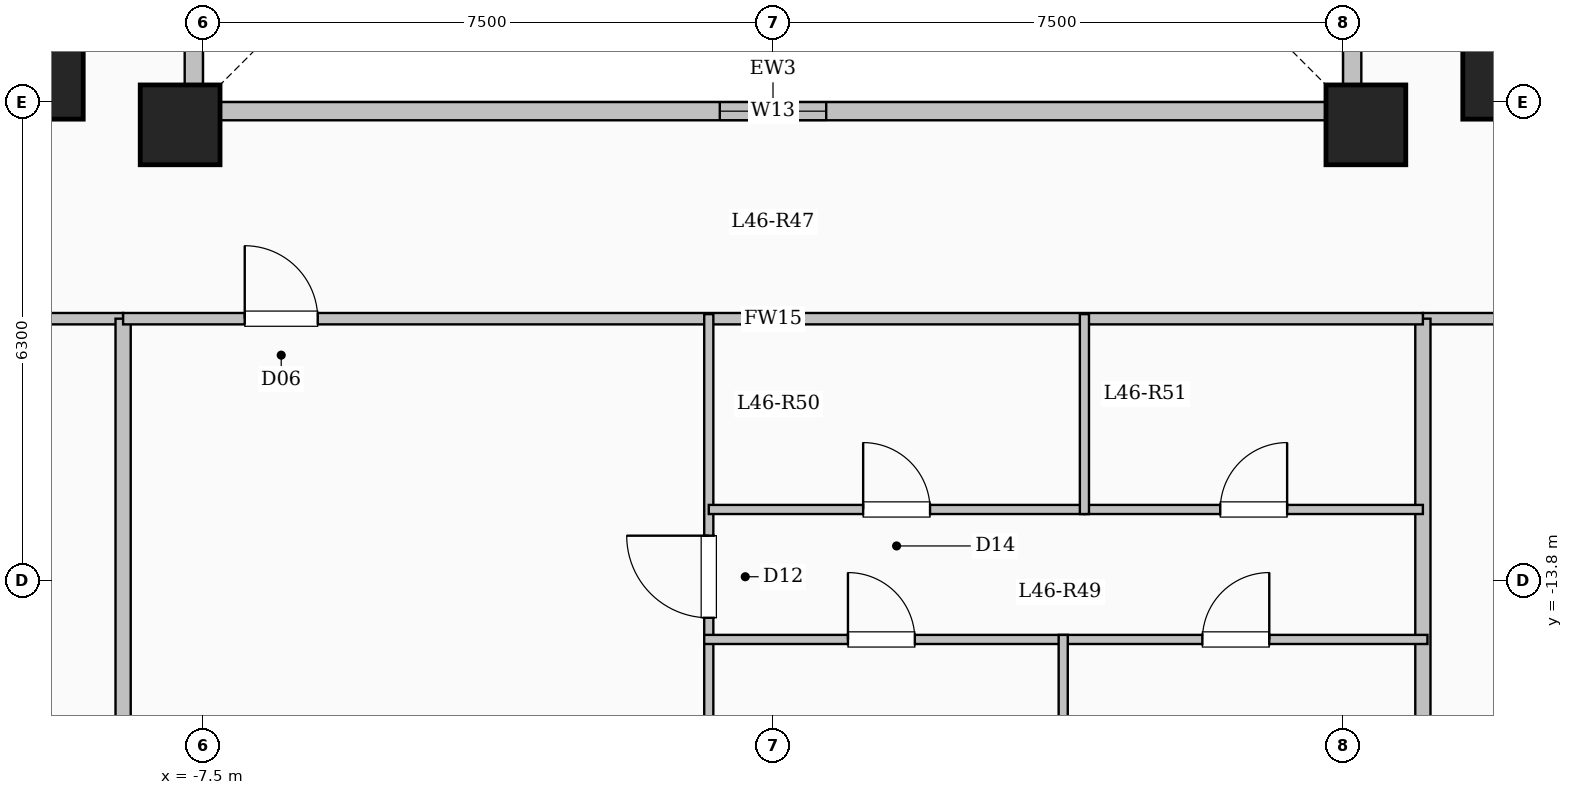
"""IFC4 building model, lengths in metres.
Left out: names, types, materials, properties, quantities, classifications, styles, units other than length and angle.
Written with IfcOpenShell. Run it as: python <this file> out.ifc"""

import sys

from ifc_helpers import new_model, si_unit, direction, frame, frame_2d, origin, origin_2d, place, context, subcontext, project, spatial, rectangle, extrude, element, fill, save


model = new_model("IFC4")
c1 = context("Model", 3, precision=1e-05, world=origin(), true_north=direction((0.0, 1.0)))
c2 = subcontext(c1, "Body", "Model", "MODEL_VIEW")
j1 = project(units=[si_unit("LENGTHUNIT", "METRE"), si_unit("PLANEANGLEUNIT", "RADIAN")], contexts=[c1])
p1 = place(None, origin())
s1 = spatial("IfcSite", under=j1, at=p1, CompositionType="ELEMENT")
p2 = place(p1, origin())
s2 = spatial("IfcBuilding", under=s1, at=p2, CompositionType="ELEMENT")
p3 = place(p2, frame((0.0, 0.0, 169.45)))
s3 = spatial("IfcBuildingStorey", under=s2, at=p3, CompositionType="ELEMENT", Elevation=169.45)
for number, where, z_axis, x_axis in (
    (1, (-7.8, -7.8, 0.0), (0.0, 0.0, 1.0), (1.0, 0.0, 0.0)),
    (2, (7.8, -7.8, 0.0), (0.0, 0.0, 1.0), (1.0, 0.0, 0.0)),
    (3, (-9.6, -7.2, 0.0), (0.0, 0.0, 1.0), (1.0, 0.0, 0.0)),
    (4, (9.6, -7.2, 0.0), (0.0, 0.0, 1.0), (1.0, 0.0, 0.0)),
):
    element("IfcColumn", number, at=place(p3, frame(where, z_axis=z_axis, x_axis=x_axis)), inside=s3, PredefinedType="COLUMN", context=c2, shape_type="SweptSolid", body=[
        extrude(rectangle(XDim=1.05, YDim=1.05, at=origin_2d()), origin(), (0.0, 0.0, 1.0), 3.35),
    ])
p4 = place(p3, frame((-7.62, -7.62, 0.0), z_axis=(0.0, 0.0, 1.0), x_axis=(1.0, 0.0, 0.0)))
e5 = element("IfcWall", 5, at=p4, inside=s3, PredefinedType="SOLIDWALL", context=c2, shape_type="SweptSolid", body=[
    extrude(rectangle(XDim=15.24, YDim=0.24, at=frame_2d((7.62, 0.0))), origin(), (0.0, 0.0, 1.0), 3.05),
])
p5 = place(p4, frame((6.92, 0.0, 0.95)))
e6 = element("IfcOpeningElement", 6, at=p5, cuts=e5, PredefinedType="OPENING", context=c2, shape_type="SweptSolid", body=[
    extrude(rectangle(XDim=1.4, YDim=1.5, at=frame_2d((0.7, 0.75))), frame((0.0, 0.13, 0.0), z_axis=(0.0, -1.0, 0.0), x_axis=(1.0, 0.0, 0.0)), (0.0, 0.0, 1.0), 0.26),
])
p6 = place(p3, frame((7.62, -7.62, 0.0), z_axis=(0.0, 0.0, 1.0), x_axis=(0.0, 1.0, 0.0)))
e7 = element("IfcWall", 7, at=p6, inside=s3, PredefinedType="SOLIDWALL", context=c2, shape_type="SweptSolid", body=[
    extrude(rectangle(XDim=15.24, YDim=0.24, at=frame_2d((7.62, 0.0))), origin(), (0.0, 0.0, 1.0), 3.05),
])
p7 = place(p6, frame((6.92, 0.0, 0.95)))
e8 = element("IfcOpeningElement", 8, at=p7, cuts=e7, PredefinedType="OPENING", context=c2, shape_type="SweptSolid", body=[
    extrude(rectangle(XDim=1.4, YDim=1.5, at=frame_2d((0.7, 0.75))), frame((0.0, 0.13, 0.0), z_axis=(0.0, -1.0, 0.0), x_axis=(1.0, 0.0, 0.0)), (0.0, 0.0, 1.0), 0.26),
])
p8 = place(p3, frame((-7.62, 7.62, 0.0), z_axis=(0.0, 0.0, 1.0), x_axis=(0.0, -1.0, 0.0)))
e9 = element("IfcWall", 9, at=p8, inside=s3, PredefinedType="SOLIDWALL", context=c2, shape_type="SweptSolid", body=[
    extrude(rectangle(XDim=15.24, YDim=0.24, at=frame_2d((7.62, 0.0))), origin(), (0.0, 0.0, 1.0), 3.05),
])
p9 = place(p8, frame((6.92, 0.0, 0.95)))
e10 = element("IfcOpeningElement", 10, at=p9, cuts=e9, PredefinedType="OPENING", context=c2, shape_type="SweptSolid", body=[
    extrude(rectangle(XDim=1.4, YDim=1.5, at=frame_2d((0.7, 0.75))), frame((0.0, 0.13, 0.0), z_axis=(0.0, -1.0, 0.0), x_axis=(1.0, 0.0, 0.0)), (0.0, 0.0, 1.0), 0.26),
])
p10 = place(p3, frame((-19.55, -10.35, 0.0), z_axis=(0.0, 0.0, 1.0), x_axis=(1.0, 0.0, 0.0)))
e11 = element("IfcWall", 11, at=p10, inside=s3, PredefinedType="PARTITIONING", context=c2, shape_type="SweptSolid", body=[
    extrude(rectangle(XDim=11.0, YDim=0.15, at=frame_2d((5.5, 0.0))), origin(), (0.0, 0.0, 1.0), 3.05),
])
p11 = place(p10, frame((1.466, 0.0, 0.0)))
e12 = element("IfcOpeningElement", 12, at=p11, cuts=e11, PredefinedType="OPENING", context=c2, shape_type="SweptSolid", body=[
    extrude(rectangle(XDim=0.95, YDim=2.15, at=frame_2d((0.475, 1.075))), frame((0.0, 0.085, 0.0), z_axis=(0.0, -1.0, 0.0), x_axis=(1.0, 0.0, 0.0)), (0.0, 0.0, 1.0), 0.17),
])
p12 = place(p10, frame((5.438, 0.0, 0.0)))
e13 = element("IfcOpeningElement", 13, at=p12, cuts=e11, PredefinedType="OPENING", context=c2, shape_type="SweptSolid", body=[
    extrude(rectangle(XDim=0.95, YDim=2.15, at=frame_2d((0.475, 1.075))), frame((0.0, 0.085, 0.0), z_axis=(0.0, -1.0, 0.0), x_axis=(1.0, 0.0, 0.0)), (0.0, 0.0, 1.0), 0.17),
])
p13 = place(p10, frame((8.972, 0.0, 0.0)))
e14 = element("IfcOpeningElement", 14, at=p13, cuts=e11, PredefinedType="OPENING", context=c2, shape_type="SweptSolid", body=[
    extrude(rectangle(XDim=0.95, YDim=2.15, at=frame_2d((0.475, 1.075))), frame((0.0, 0.085, 0.0), z_axis=(0.0, -1.0, 0.0), x_axis=(1.0, 0.0, 0.0)), (0.0, 0.0, 1.0), 0.17),
])
p14 = place(p3, frame((8.55, -10.35, 0.0), z_axis=(0.0, 0.0, 1.0), x_axis=(1.0, 0.0, 0.0)))
e15 = element("IfcWall", 15, at=p14, inside=s3, PredefinedType="PARTITIONING", context=c2, shape_type="SweptSolid", body=[
    extrude(rectangle(XDim=11.0, YDim=0.15, at=frame_2d((5.5, 0.0))), origin(), (0.0, 0.0, 1.0), 3.05),
])
p15 = place(p14, frame((1.516, 0.0, 0.0)))
e16 = element("IfcOpeningElement", 16, at=p15, cuts=e15, PredefinedType="OPENING", context=c2, shape_type="SweptSolid", body=[
    extrude(rectangle(XDim=0.95, YDim=2.15, at=frame_2d((0.475, 1.075))), frame((0.0, 0.085, 0.0), z_axis=(0.0, -1.0, 0.0), x_axis=(1.0, 0.0, 0.0)), (0.0, 0.0, 1.0), 0.17),
])
p16 = place(p14, frame((5.488, 0.0, 0.0)))
e17 = element("IfcOpeningElement", 17, at=p16, cuts=e15, PredefinedType="OPENING", context=c2, shape_type="SweptSolid", body=[
    extrude(rectangle(XDim=0.95, YDim=2.15, at=frame_2d((0.475, 1.075))), frame((0.0, 0.085, 0.0), z_axis=(0.0, -1.0, 0.0), x_axis=(1.0, 0.0, 0.0)), (0.0, 0.0, 1.0), 0.17),
])
p17 = place(p14, frame((9.022, 0.0, 0.0)))
e18 = element("IfcOpeningElement", 18, at=p17, cuts=e15, PredefinedType="OPENING", context=c2, shape_type="SweptSolid", body=[
    extrude(rectangle(XDim=0.95, YDim=2.15, at=frame_2d((0.475, 1.075))), frame((0.0, 0.085, 0.0), z_axis=(0.0, -1.0, 0.0), x_axis=(1.0, 0.0, 0.0)), (0.0, 0.0, 1.0), 0.17),
])
for number, where, z_axis, x_axis in (
    (19, (-8.55, -21.804, 0.0), (0.0, 0.0, 1.0), (0.0, 1.0, 0.0)),
    (20, (8.55, -21.804, 0.0), (0.0, 0.0, 1.0), (0.0, 1.0, 0.0)),
):
    element("IfcWall", number, at=place(p3, frame(where, z_axis=z_axis, x_axis=x_axis)), inside=s3, PredefinedType="SOLIDWALL", context=c2, shape_type="SweptSolid", body=[
        extrude(rectangle(XDim=11.454, YDim=0.2, at=frame_2d((5.727, 0.0))), origin(), (0.0, 0.0, 1.0), 3.05),
    ])
p18 = place(p3, frame((-8.55, -10.35, 0.0), z_axis=(0.0, 0.0, 1.0), x_axis=(1.0, 0.0, 0.0)))
e21 = element("IfcWall", 21, at=p18, inside=s3, PredefinedType="PARTITIONING", context=c2, shape_type="SweptSolid", body=[
    extrude(rectangle(XDim=17.1, YDim=0.15, at=frame_2d((8.55, 0.0))), origin(), (0.0, 0.0, 1.0), 3.05),
])
p19 = place(p18, frame((1.6, 0.0, 0.0)))
e22 = element("IfcOpeningElement", 22, at=p19, cuts=e21, PredefinedType="OPENING", context=c2, shape_type="SweptSolid", body=[
    extrude(rectangle(XDim=0.96, YDim=2.15, at=frame_2d((0.48, 1.075))), frame((0.0, 0.085, 0.0), z_axis=(0.0, -1.0, 0.0), x_axis=(1.0, 0.0, 0.0)), (0.0, 0.0, 1.0), 0.17),
])
p20 = place(p3, frame((-0.845, -22.68, 0.0), z_axis=(0.0, 0.0, 1.0), x_axis=(0.0, 1.0, 0.0)))
e23 = element("IfcWall", 23, at=p20, inside=s3, PredefinedType="PARTITIONING", context=c2, shape_type="SweptSolid", body=[
    extrude(rectangle(XDim=12.39, YDim=0.12, at=frame_2d((6.195, 0.0))), origin(), (0.0, 0.0, 1.0), 3.05),
])
p21 = place(p20, frame((8.395, 0.0, 0.0)))
e24 = element("IfcOpeningElement", 24, at=p21, cuts=e23, PredefinedType="OPENING", context=c2, shape_type="SweptSolid", body=[
    extrude(rectangle(XDim=1.08, YDim=2.15, at=frame_2d((0.54, 1.075))), frame((0.0, 0.07, 0.0), z_axis=(0.0, -1.0, 0.0), x_axis=(1.0, 0.0, 0.0)), (0.0, 0.0, 1.0), 0.14),
])
p22 = place(p3, frame((-0.845, -12.86, 0.0), z_axis=(0.0, 0.0, 1.0), x_axis=(1.0, 0.0, 0.0)))
e25 = element("IfcWall", 25, at=p22, inside=s3, PredefinedType="PARTITIONING", context=c2, shape_type="SweptSolid", body=[
    extrude(rectangle(XDim=4.942, YDim=0.12, at=frame_2d((2.471, 0.0))), origin(), (0.0, 0.0, 1.0), 3.05),
])
p23 = place(p22, frame((2.031, 0.0, 0.0)))
e26 = element("IfcOpeningElement", 26, at=p23, cuts=e25, PredefinedType="OPENING", context=c2, shape_type="SweptSolid", body=[
    extrude(rectangle(XDim=0.88, YDim=2.1, at=frame_2d((0.44, 1.05))), frame((0.0, 0.07, 0.0), z_axis=(0.0, -1.0, 0.0), x_axis=(1.0, 0.0, 0.0)), (0.0, 0.0, 1.0), 0.14),
])
p24 = place(p3, frame((4.097, -12.86, 0.0), z_axis=(0.0, 0.0, 1.0), x_axis=(1.0, 0.0, 0.0)))
e27 = element("IfcWall", 27, at=p24, inside=s3, PredefinedType="PARTITIONING", context=c2, shape_type="SweptSolid", body=[
    extrude(rectangle(XDim=4.453, YDim=0.12, at=frame_2d((2.227, 0.0))), origin(), (0.0, 0.0, 1.0), 3.05),
])
p25 = place(p24, frame((1.787, 0.0, 0.0)))
e28 = element("IfcOpeningElement", 28, at=p25, cuts=e27, PredefinedType="OPENING", context=c2, shape_type="SweptSolid", body=[
    extrude(rectangle(XDim=0.88, YDim=2.1, at=frame_2d((0.44, 1.05))), frame((0.0, 0.07, 0.0), z_axis=(0.0, -1.0, 0.0), x_axis=(1.0, 0.0, 0.0)), (0.0, 0.0, 1.0), 0.14),
])
p26 = place(p3, frame((-0.905, -14.57, 0.0), z_axis=(0.0, 0.0, 1.0), x_axis=(1.0, 0.0, 0.0)))
e29 = element("IfcWall", 29, at=p26, inside=s3, PredefinedType="PARTITIONING", context=c2, shape_type="SweptSolid", body=[
    extrude(rectangle(XDim=9.515, YDim=0.12, at=frame_2d((4.758, 0.0))), origin(), (0.0, 0.0, 1.0), 3.05),
])
p27 = place(p26, frame((1.891, 0.0, 0.0)))
e30 = element("IfcOpeningElement", 30, at=p27, cuts=e29, PredefinedType="OPENING", context=c2, shape_type="SweptSolid", body=[
    extrude(rectangle(XDim=0.88, YDim=2.1, at=frame_2d((0.44, 1.05))), frame((0.0, 0.07, 0.0), z_axis=(0.0, -1.0, 0.0), x_axis=(1.0, 0.0, 0.0)), (0.0, 0.0, 1.0), 0.14),
])
p28 = place(p26, frame((6.554, 0.0, 0.0)))
e31 = element("IfcOpeningElement", 31, at=p28, cuts=e29, PredefinedType="OPENING", context=c2, shape_type="SweptSolid", body=[
    extrude(rectangle(XDim=0.88, YDim=2.1, at=frame_2d((0.44, 1.05))), frame((0.0, 0.07, 0.0), z_axis=(0.0, -1.0, 0.0), x_axis=(1.0, 0.0, 0.0)), (0.0, 0.0, 1.0), 0.14),
])
p29 = place(p3, frame((4.097, -12.92, 0.0), z_axis=(0.0, 0.0, 1.0), x_axis=(0.0, 1.0, 0.0)))
e32 = element("IfcWall", 32, at=p29, inside=s3, PredefinedType="PARTITIONING", context=c2, shape_type="SweptSolid", body=[
    extrude(rectangle(XDim=2.63, YDim=0.12, at=frame_2d((1.315, 0.0))), origin(), (0.0, 0.0, 1.0), 3.05),
])
p30 = place(p3, frame((3.818, -22.68, 0.0), z_axis=(0.0, 0.0, 1.0), x_axis=(0.0, 1.0, 0.0)))
e33 = element("IfcWall", 33, at=p30, inside=s3, PredefinedType="PARTITIONING", context=c2, shape_type="SweptSolid", body=[
    extrude(rectangle(XDim=8.17, YDim=0.12, at=frame_2d((4.085, 0.0))), origin(), (0.0, 0.0, 1.0), 3.05),
])
p31 = place(p5, origin())
e34 = element("IfcWindow", 34, at=p31, inside=s3, PartitioningType="SINGLE_PANEL", PredefinedType="WINDOW", context=c2, shape_type="SweptSolid", body=[
    extrude(rectangle(XDim=1.4, YDim=1.5, at=frame_2d((0.7, 0.75))), frame((0.0, 0.03, 0.0), z_axis=(0.0, -1.0, 0.0), x_axis=(1.0, 0.0, 0.0)), (0.0, 0.0, 1.0), 0.06),
])
fill(e6, e34)
p32 = place(p19, origin())
e35 = element("IfcDoor", 35, at=p32, inside=s3, OperationType="SINGLE_SWING_LEFT", PredefinedType="DOOR", context=c2, shape_type="SweptSolid", body=[
    extrude(rectangle(XDim=0.96, YDim=2.15, at=frame_2d((0.48, 1.075))), frame((0.0, 0.025, 0.0), z_axis=(0.0, -1.0, 0.0), x_axis=(1.0, 0.0, 0.0)), (0.0, 0.0, 1.0), 0.05),
])
fill(e22, e35)
p33 = place(p21, origin())
e36 = element("IfcDoor", 36, at=p33, inside=s3, OperationType="SINGLE_SWING_RIGHT", PredefinedType="DOOR", context=c2, shape_type="SweptSolid", body=[
    extrude(rectangle(XDim=1.08, YDim=2.15, at=frame_2d((0.54, 1.075))), frame((0.0, 0.025, 0.0), z_axis=(0.0, -1.0, 0.0), x_axis=(1.0, 0.0, 0.0)), (0.0, 0.0, 1.0), 0.05),
])
fill(e24, e36)
p34 = place(p23, origin())
e37 = element("IfcDoor", 37, at=p34, inside=s3, OperationType="SINGLE_SWING_LEFT", PredefinedType="DOOR", context=c2, shape_type="SweptSolid", body=[
    extrude(rectangle(XDim=0.88, YDim=2.1, at=frame_2d((0.44, 1.05))), frame((0.0, 0.025, 0.0), z_axis=(0.0, -1.0, 0.0), x_axis=(1.0, 0.0, 0.0)), (0.0, 0.0, 1.0), 0.05),
])
fill(e26, e37)
p35 = place(p25, origin())
e38 = element("IfcDoor", 38, at=p35, inside=s3, OperationType="SINGLE_SWING_RIGHT", PredefinedType="DOOR", context=c2, shape_type="SweptSolid", body=[
    extrude(rectangle(XDim=0.88, YDim=2.1, at=frame_2d((0.44, 1.05))), frame((0.0, 0.025, 0.0), z_axis=(0.0, -1.0, 0.0), x_axis=(1.0, 0.0, 0.0)), (0.0, 0.0, 1.0), 0.05),
])
fill(e28, e38)
p36 = place(p27, origin())
e39 = element("IfcDoor", 39, at=p36, inside=s3, OperationType="SINGLE_SWING_LEFT", PredefinedType="DOOR", context=c2, shape_type="SweptSolid", body=[
    extrude(rectangle(XDim=0.88, YDim=2.1, at=frame_2d((0.44, 1.05))), frame((0.0, 0.025, 0.0), z_axis=(0.0, -1.0, 0.0), x_axis=(1.0, 0.0, 0.0)), (0.0, 0.0, 1.0), 0.05),
])
fill(e30, e39)
p37 = place(p28, origin())
e40 = element("IfcDoor", 40, at=p37, inside=s3, OperationType="SINGLE_SWING_RIGHT", PredefinedType="DOOR", context=c2, shape_type="SweptSolid", body=[
    extrude(rectangle(XDim=0.88, YDim=2.1, at=frame_2d((0.44, 1.05))), frame((0.0, 0.025, 0.0), z_axis=(0.0, -1.0, 0.0), x_axis=(1.0, 0.0, 0.0)), (0.0, 0.0, 1.0), 0.05),
])
fill(e31, e40)
save(model, sys.argv[1])
